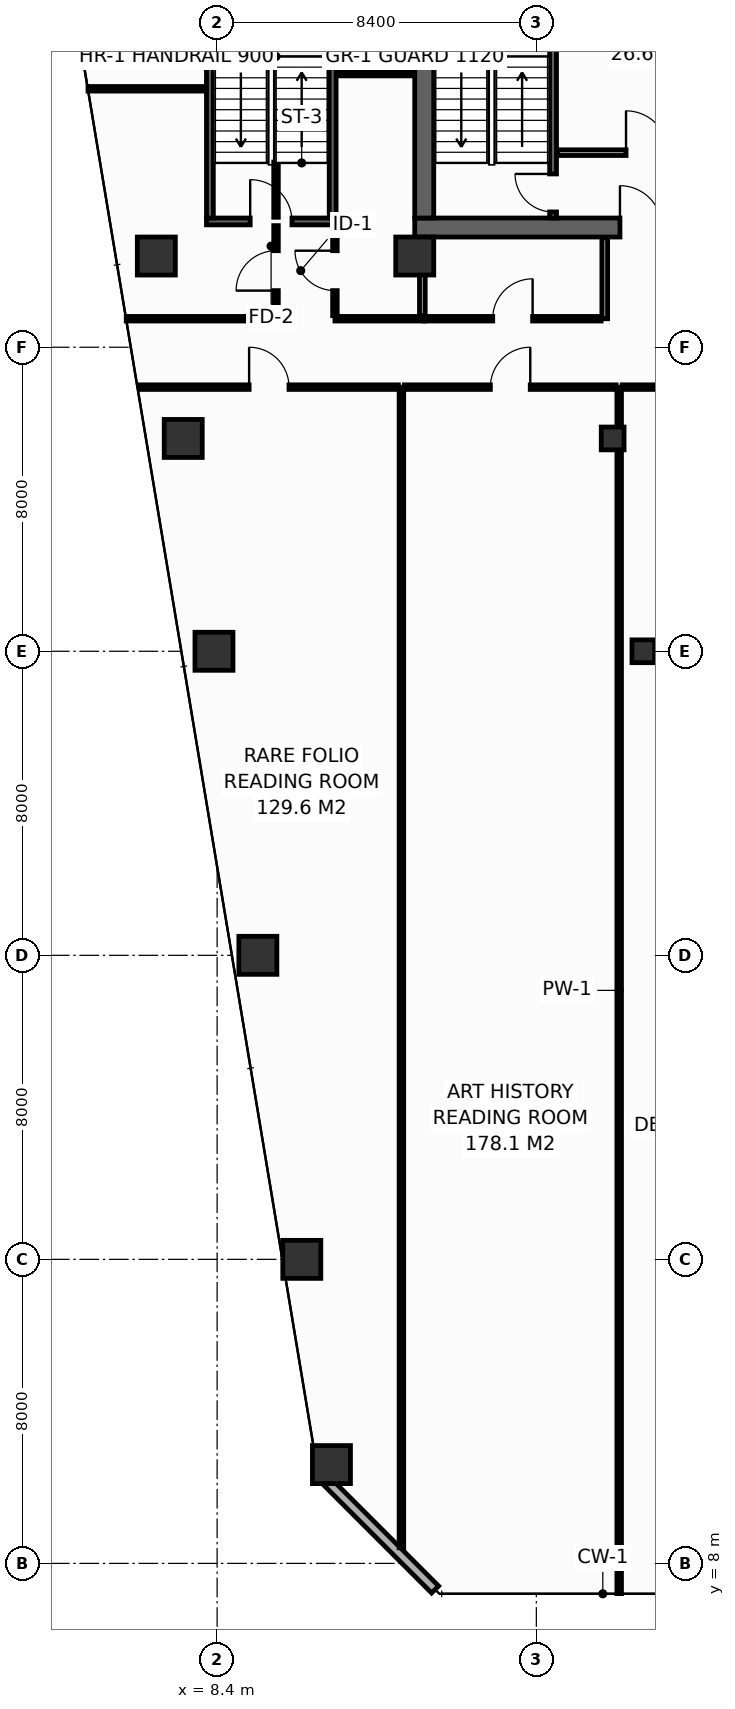
"""IFC4 building model, lengths in metres.
Left out: names, types, materials, properties, quantities, classifications, styles, units other than length and angle.
Written with IfcOpenShell. Run it as: python <this file> out.ifc"""

import sys

from ifc_helpers import new_model, si_unit, direction, frame, frame_2d, origin, origin_2d, place, context, subcontext, project, spatial, rectangle, hollow_rectangle, extrude, element, fill, save


model = new_model("IFC4")
c1 = context("Model", 3, precision=1e-05, world=origin(), true_north=direction((0.0, 1.0)))
c2 = subcontext(c1, "Body", "Model", "MODEL_VIEW")
j1 = project(units=[si_unit("LENGTHUNIT", "METRE"), si_unit("PLANEANGLEUNIT", "RADIAN")], contexts=[c1])
p1 = place(None, origin())
s1 = spatial("IfcSite", under=j1, at=p1, CompositionType="ELEMENT")
p2 = place(p1, origin())
s2 = spatial("IfcBuilding", under=s1, at=p2, CompositionType="ELEMENT")
p3 = place(p2, frame((0.0, 0.0, 133.4)))
s3 = spatial("IfcBuildingStorey", under=s2, at=p3, CompositionType="ELEMENT", Elevation=133.4)
p4 = place(p3, frame((13.6, 43.15, 0.0), z_axis=(0.0, 0.0, 1.0), x_axis=(1.0, 0.0, 0.0)))
e1 = element("IfcWall", 1, at=p4, inside=s3, PredefinedType="SHEAR", context=c2, shape_type="SweptSolid", body=[
    extrude(rectangle(XDim=32.7, YDim=0.5, at=frame_2d((16.35, 0.0))), origin(), (0.0, 0.0, 1.0), 3.55),
])
p5 = place(p4, frame((5.4, 0.0, 0.0)))
e2 = element("IfcOpeningElement", 2, at=p5, cuts=e1, PredefinedType="OPENING", context=c2, shape_type="SweptSolid", body=[
    extrude(rectangle(XDim=1.1, YDim=2.15, at=frame_2d((0.55, 1.075))), frame((0.0, 0.26, 0.0), z_axis=(0.0, -1.0, 0.0), x_axis=(1.0, 0.0, 0.0)), (0.0, 0.0, 1.0), 0.52),
])
p6 = place(p4, frame((25.6, 0.0, 0.0)))
e3 = element("IfcOpeningElement", 3, at=p6, cuts=e1, PredefinedType="OPENING", context=c2, shape_type="SweptSolid", body=[
    extrude(rectangle(XDim=1.1, YDim=2.15, at=frame_2d((0.55, 1.075))), frame((0.0, 0.26, 0.0), z_axis=(0.0, -1.0, 0.0), x_axis=(1.0, 0.0, 0.0)), (0.0, 0.0, 1.0), 0.52),
])
p7 = place(p3, frame((13.85, 43.4, 0.0), z_axis=(0.0, 0.0, 1.0), x_axis=(0.0, 1.0, 0.0)))
e4 = element("IfcWall", 4, at=p7, inside=s3, PredefinedType="SHEAR", context=c2, shape_type="SweptSolid", body=[
    extrude(rectangle(XDim=10.4, YDim=0.5, at=frame_2d((5.2, 0.0))), origin(), (0.0, 0.0, 1.0), 3.55),
])
for number, where, z_axis, x_axis in (
    (5, (6.8, 42.4, 0.0), (0.0, 0.0, 1.0), (1.0, 0.0, 0.0)),
    (6, (13.6, 42.4, 0.0), (0.0, 0.0, 1.0), (1.0, 0.0, 0.0)),
    (7, (11.408, 10.6, 0.0), (0.0, 0.0, 1.0), (1.0, 0.0, 0.0)),
    (8, (10.628, 16.0, 0.0), (0.0, 0.0, 1.0), (1.0, 0.0, 0.0)),
    (9, (9.472, 24.0, 0.0), (0.0, 0.0, 1.0), (1.0, 0.0, 0.0)),
    (10, (8.317, 32.0, 0.0), (0.0, 0.0, 1.0), (1.0, 0.0, 0.0)),
):
    element("IfcColumn", number, at=place(p3, frame(where, z_axis=z_axis, x_axis=x_axis)), inside=s3, PredefinedType="COLUMN", context=c2, shape_type="SweptSolid", body=[
        extrude(hollow_rectangle(XDim=1.0, YDim=1.0, WallThickness=0.045, at=origin_2d()), origin(), (0.0, 0.0, 1.0), 3.8),
    ])
p8 = place(p3, frame((19.617, 32.0, 0.0), z_axis=(0.0, 0.0, 1.0), x_axis=(1.0, 0.0, 0.0)))
e11 = element("IfcColumn", 11, at=p8, inside=s3, PredefinedType="COLUMN", context=c2, shape_type="SweptSolid", body=[
    extrude(hollow_rectangle(XDim=0.6, YDim=0.6, WallThickness=0.028, at=origin_2d()), origin(), (0.0, 0.0, 1.0), 3.8),
])
p9 = place(p3, frame((7.508, 37.6, 0.0), z_axis=(0.0, 0.0, 1.0), x_axis=(1.0, 0.0, 0.0)))
e12 = element("IfcColumn", 12, at=p9, inside=s3, PredefinedType="COLUMN", context=c2, shape_type="SweptSolid", body=[
    extrude(hollow_rectangle(XDim=1.0, YDim=1.0, WallThickness=0.045, at=origin_2d()), origin(), (0.0, 0.0, 1.0), 3.8),
])
p10 = place(p3, frame((18.808, 37.6, 0.0), z_axis=(0.0, 0.0, 1.0), x_axis=(1.0, 0.0, 0.0)))
e13 = element("IfcColumn", 13, at=p10, inside=s3, PredefinedType="COLUMN", context=c2, shape_type="SweptSolid", body=[
    extrude(hollow_rectangle(XDim=0.6, YDim=0.6, WallThickness=0.028, at=origin_2d()), origin(), (0.0, 0.0, 1.0), 3.8),
])
p11 = place(p3, frame((17.24, 43.4, 0.0), z_axis=(0.0, 0.0, 1.0), x_axis=(0.0, 1.0, 0.0)))
e14 = element("IfcWall", 14, at=p11, inside=s3, PredefinedType="SHEAR", context=c2, shape_type="SweptSolid", body=[
    extrude(rectangle(XDim=10.4, YDim=0.18, at=frame_2d((5.2, 0.0))), origin(), (0.0, 0.0, 1.0), 3.55),
])
p12 = place(p11, frame((0.16, 0.0, 0.0)))
e15 = element("IfcOpeningElement", 15, at=p12, cuts=e14, PredefinedType="OPENING", context=c2, shape_type="SweptSolid", body=[
    extrude(rectangle(XDim=1.0, YDim=2.15, at=frame_2d((0.5, 1.075))), frame((0.0, 0.1, 0.0), z_axis=(0.0, -1.0, 0.0), x_axis=(1.0, 0.0, 0.0)), (0.0, 0.0, 1.0), 0.2),
])
p13 = place(p3, frame((8.12, 43.31, 0.0), z_axis=(0.0, 0.0, 1.0), x_axis=(1.0, 0.0, 0.0)))
e16 = element("IfcWall", 16, at=p13, inside=s3, PredefinedType="SHEAR", context=c2, shape_type="SweptSolid", body=[
    extrude(rectangle(XDim=3.41, YDim=0.18, at=frame_2d((1.705, 0.0))), origin(), (0.0, 0.0, 1.0), 3.55),
])
p14 = place(p13, frame((1.15, 0.0, 0.0)))
e17 = element("IfcOpeningElement", 17, at=p14, cuts=e16, PredefinedType="OPENING", context=c2, shape_type="SweptSolid", body=[
    extrude(rectangle(XDim=1.1, YDim=2.15, at=frame_2d((0.55, 1.075))), frame((0.0, 0.1, 0.0), z_axis=(0.0, -1.0, 0.0), x_axis=(1.0, 0.0, 0.0)), (0.0, 0.0, 1.0), 0.2),
])
for number, where, z_axis, x_axis in (
    (18, (11.44, 43.4, 0.0), (0.0, 0.0, 1.0), (0.0, 1.0, 0.0)),
    (19, (8.21, 53.8, 0.0), (0.0, 0.0, 1.0), (0.0, -1.0, 0.0)),
):
    element("IfcWall", number, at=place(p3, frame(where, z_axis=z_axis, x_axis=x_axis)), inside=s3, PredefinedType="SHEAR", context=c2, shape_type="SweptSolid", body=[
        extrude(rectangle(XDim=10.4, YDim=0.18, at=frame_2d((5.2, 0.0))), origin(), (0.0, 0.0, 1.0), 3.55),
    ])
p15 = place(p3, frame((17.36, 45.12, 0.0), z_axis=(0.0, 0.0, 1.0), x_axis=(1.0, 0.0, 0.0)))
e20 = element("IfcWall", 20, at=p15, inside=s3, PredefinedType="PARTITIONING", context=c2, shape_type="SweptSolid", body=[
    extrude(rectangle(XDim=5.14, YDim=0.15, at=frame_2d((2.57, 0.0))), origin(), (0.0, 0.0, 1.0), 3.55),
])
p16 = place(p15, frame((1.8, 0.0, 0.0)))
e21 = element("IfcOpeningElement", 21, at=p16, cuts=e20, PredefinedType="OPENING", context=c2, shape_type="SweptSolid", body=[
    extrude(rectangle(XDim=1.1, YDim=2.15, at=frame_2d((0.55, 1.075))), frame((0.0, 0.085, 0.0), z_axis=(0.0, -1.0, 0.0), x_axis=(1.0, 0.0, 0.0)), (0.0, 0.0, 1.0), 0.17),
])
p17 = place(p3, frame((11.162, 10.287, 0.0), z_axis=(0.0, 0.0, 1.0), x_axis=(0.70707775441, -0.707135806771, 0.0)))
e22 = element("IfcWall", 22, at=p17, inside=s3, PredefinedType="STANDARD", context=c2, shape_type="SweptSolid", body=[
    extrude(rectangle(XDim=4.206, YDim=0.26, at=frame_2d((2.103, 0.0))), origin(), (0.0, 0.0, 1.0), 3.55),
])
p18 = place(p3, frame((6.008, 40.75, 0.0), z_axis=(0.0, 0.0, 1.0), x_axis=(1.0, 0.0, 0.0)))
e23 = element("IfcWall", 23, at=p18, inside=s3, PredefinedType="PARTITIONING", context=c2, shape_type="SweptSolid", body=[
    extrude(rectangle(XDim=3.942, YDim=0.12, at=frame_2d((1.971, 0.0))), origin(), (0.0, 0.0, 1.0), 3.035),
])
p19 = place(p3, frame((11.5, 40.75, 0.0), z_axis=(0.0, 0.0, 1.0), x_axis=(1.0, 0.0, 0.0)))
e24 = element("IfcWall", 24, at=p19, inside=s3, PredefinedType="PARTITIONING", context=c2, shape_type="SweptSolid", body=[
    extrude(rectangle(XDim=2.35, YDim=0.12, at=frame_2d((1.175, 0.0))), origin(), (0.0, 0.0, 1.0), 3.55),
])
p20 = place(p3, frame((5.003, 46.8, 0.0), z_axis=(0.0, 0.0, 1.0), x_axis=(1.0, 0.0, 0.0)))
e25 = element("IfcWall", 25, at=p20, inside=s3, PredefinedType="PARTITIONING", context=c2, shape_type="SweptSolid", body=[
    extrude(rectangle(XDim=3.097, YDim=0.12, at=frame_2d((1.549, 0.0))), origin(), (0.0, 0.0, 1.0), 2.835),
])
p21 = place(p3, frame((9.95, 40.83, 0.0), z_axis=(0.0, 0.0, 1.0), x_axis=(0.0, 1.0, 0.0)))
e26 = element("IfcWall", 26, at=p21, inside=s3, PredefinedType="PARTITIONING", context=c2, shape_type="SweptSolid", body=[
    extrude(rectangle(XDim=2.37, YDim=0.12, at=frame_2d((1.185, 0.0))), origin(), (0.0, 0.0, 1.0), 2.835),
])
p22 = place(p21, frame((0.66, 0.0, 0.0)))
e27 = element("IfcOpeningElement", 27, at=p22, cuts=e26, PredefinedType="OPENING", context=c2, shape_type="SweptSolid", body=[
    extrude(rectangle(XDim=1.05, YDim=2.15, at=frame_2d((0.525, 1.075))), frame((0.0, 0.07, 0.0), z_axis=(0.0, -1.0, 0.0), x_axis=(1.0, 0.0, 0.0)), (0.0, 0.0, 1.0), 0.14),
])
p23 = place(p3, frame((9.95, 43.42, 0.0), z_axis=(0.0, 0.0, 1.0), x_axis=(0.0, 1.0, 0.0)))
e28 = element("IfcWall", 28, at=p23, inside=s3, PredefinedType="PARTITIONING", context=c2, shape_type="SweptSolid", body=[
    extrude(rectangle(XDim=1.45, YDim=0.12, at=frame_2d((0.725, 0.0))), origin(), (0.0, 0.0, 1.0), 3.55),
])
p24 = place(p3, frame((11.55, 47.2, 0.0), z_axis=(0.0, 0.0, 1.0), x_axis=(1.0, 0.0, 0.0)))
e29 = element("IfcWall", 29, at=p24, inside=s3, PredefinedType="PARTITIONING", context=c2, shape_type="SweptSolid", body=[
    extrude(rectangle(XDim=2.03, YDim=0.12, at=frame_2d((1.015, 0.0))), origin(), (0.0, 0.0, 1.0), 3.55),
])
p25 = place(p3, frame((11.5, 40.83, 0.0), z_axis=(0.0, 0.0, 1.0), x_axis=(0.0, 1.0, 0.0)))
e30 = element("IfcWall", 30, at=p25, inside=s3, PredefinedType="PARTITIONING", context=c2, shape_type="SweptSolid", body=[
    extrude(rectangle(XDim=2.37, YDim=0.12, at=frame_2d((1.185, 0.0))), origin(), (0.0, 0.0, 1.0), 2.835),
])
p26 = place(p25, frame((0.66, 0.0, 0.0)))
e31 = element("IfcOpeningElement", 31, at=p26, cuts=e30, PredefinedType="OPENING", context=c2, shape_type="SweptSolid", body=[
    extrude(rectangle(XDim=1.05, YDim=2.15, at=frame_2d((0.525, 1.075))), frame((0.0, 0.07, 0.0), z_axis=(0.0, -1.0, 0.0), x_axis=(1.0, 0.0, 0.0)), (0.0, 0.0, 1.0), 0.14),
])
p27 = place(p3, frame((13.8, 40.83, 0.0), z_axis=(0.0, 0.0, 1.0), x_axis=(0.0, 1.0, 0.0)))
e32 = element("IfcWall", 32, at=p27, inside=s3, PredefinedType="PARTITIONING", context=c2, shape_type="SweptSolid", body=[
    extrude(rectangle(XDim=2.05, YDim=0.15, at=frame_2d((1.025, 0.0))), origin(), (0.0, 0.0, 1.0), 3.55),
])
p28 = place(p3, frame((18.6, 40.75, 0.0), z_axis=(0.0, 0.0, 1.0), x_axis=(0.0, 1.0, 0.0)))
e33 = element("IfcWall", 33, at=p28, inside=s3, PredefinedType="PARTITIONING", context=c2, shape_type="SweptSolid", body=[
    extrude(rectangle(XDim=2.13, YDim=0.15, at=frame_2d((1.065, 0.0))), origin(), (0.0, 0.0, 1.0), 3.55),
])
p29 = place(p3, frame((13.85, 40.75, 0.0), z_axis=(0.0, 0.0, 1.0), x_axis=(1.0, 0.0, 0.0)))
e34 = element("IfcWall", 34, at=p29, inside=s3, PredefinedType="PARTITIONING", context=c2, shape_type="SweptSolid", body=[
    extrude(rectangle(XDim=4.655, YDim=0.12, at=frame_2d((2.327, 0.0))), origin(), (0.0, 0.0, 1.0), 3.55),
])
p30 = place(p29, frame((1.802, 0.0, 0.0)))
e35 = element("IfcOpeningElement", 35, at=p30, cuts=e34, PredefinedType="OPENING", context=c2, shape_type="SweptSolid", body=[
    extrude(rectangle(XDim=1.05, YDim=2.15, at=frame_2d((0.525, 1.075))), frame((0.0, 0.07, 0.0), z_axis=(0.0, -1.0, 0.0), x_axis=(1.0, 0.0, 0.0)), (0.0, 0.0, 1.0), 0.14),
])
p31 = place(p3, frame((13.25, 8.411, 0.0), z_axis=(0.0, 0.0, 1.0), x_axis=(0.0, 1.0, 0.0)))
e36 = element("IfcWall", 36, at=p31, inside=s3, PredefinedType="PARTITIONING", context=c2, shape_type="SweptSolid", body=[
    extrude(rectangle(XDim=30.539, YDim=0.12, at=frame_2d((15.27, 0.0))), origin(), (0.0, 0.0, 1.0), 2.835),
])
p32 = place(p3, frame((18.98, 7.205, 0.0), z_axis=(0.0, 0.0, 1.0), x_axis=(0.0, 1.0, 0.0)))
e37 = element("IfcWall", 37, at=p32, inside=s3, PredefinedType="PARTITIONING", context=c2, shape_type="SweptSolid", body=[
    extrude(rectangle(XDim=31.745, YDim=0.12, at=frame_2d((15.873, 0.0))), origin(), (0.0, 0.0, 1.0), 2.835),
])
p33 = place(p3, frame((6.363, 38.95, 0.0), z_axis=(0.0, 0.0, 1.0), x_axis=(1.0, 0.0, 0.0)))
e38 = element("IfcWall", 38, at=p33, inside=s3, PredefinedType="PARTITIONING", context=c2, shape_type="SweptSolid", body=[
    extrude(rectangle(XDim=6.807, YDim=0.12, at=frame_2d((3.404, 0.0))), origin(), (0.0, 0.0, 1.0), 3.035),
])
p34 = place(p33, frame((2.879, 0.0, 0.0)))
e39 = element("IfcOpeningElement", 39, at=p34, cuts=e38, PredefinedType="OPENING", context=c2, shape_type="SweptSolid", body=[
    extrude(rectangle(XDim=1.05, YDim=2.15, at=frame_2d((0.525, 1.075))), frame((0.0, 0.07, 0.0), z_axis=(0.0, -1.0, 0.0), x_axis=(1.0, 0.0, 0.0)), (0.0, 0.0, 1.0), 0.14),
])
p35 = place(p3, frame((13.33, 38.95, 0.0), z_axis=(0.0, 0.0, 1.0), x_axis=(1.0, 0.0, 0.0)))
e40 = element("IfcWall", 40, at=p35, inside=s3, PredefinedType="PARTITIONING", context=c2, shape_type="SweptSolid", body=[
    extrude(rectangle(XDim=5.57, YDim=0.12, at=frame_2d((2.785, 0.0))), origin(), (0.0, 0.0, 1.0), 3.55),
])
p36 = place(p35, frame((2.26, 0.0, 0.0)))
e41 = element("IfcOpeningElement", 41, at=p36, cuts=e40, PredefinedType="OPENING", context=c2, shape_type="SweptSolid", body=[
    extrude(rectangle(XDim=1.05, YDim=2.15, at=frame_2d((0.525, 1.075))), frame((0.0, 0.07, 0.0), z_axis=(0.0, -1.0, 0.0), x_axis=(1.0, 0.0, 0.0)), (0.0, 0.0, 1.0), 0.14),
])
p37 = place(p3, frame((19.06, 38.95, 0.0), z_axis=(0.0, 0.0, 1.0), x_axis=(1.0, 0.0, 0.0)))
e42 = element("IfcWall", 42, at=p37, inside=s3, PredefinedType="PARTITIONING", context=c2, shape_type="SweptSolid", body=[
    extrude(rectangle(XDim=4.79, YDim=0.12, at=frame_2d((2.395, 0.0))), origin(), (0.0, 0.0, 1.0), 2.835),
])
p38 = place(p37, frame((1.945, 0.0, 0.0)))
e43 = element("IfcOpeningElement", 43, at=p38, cuts=e42, PredefinedType="OPENING", context=c2, shape_type="SweptSolid", body=[
    extrude(rectangle(XDim=0.9, YDim=2.1, at=frame_2d((0.45, 1.05))), frame((0.0, 0.07, 0.0), z_axis=(0.0, -1.0, 0.0), x_axis=(1.0, 0.0, 0.0)), (0.0, 0.0, 1.0), 0.14),
])
p39 = place(p12, origin())
e44 = element("IfcDoor", 44, at=p39, inside=s3, OperationType="SINGLE_SWING_RIGHT", PredefinedType="DOOR", context=c2, shape_type="SweptSolid", body=[
    extrude(rectangle(XDim=1.0, YDim=2.15, at=frame_2d((0.5, 1.075))), frame((0.0, 0.025, 0.0), z_axis=(0.0, -1.0, 0.0), x_axis=(1.0, 0.0, 0.0)), (0.0, 0.0, 1.0), 0.05),
])
fill(e15, e44)
p40 = place(p14, origin())
e45 = element("IfcDoor", 45, at=p40, inside=s3, OperationType="SINGLE_SWING_LEFT", PredefinedType="DOOR", context=c2, shape_type="SweptSolid", body=[
    extrude(rectangle(XDim=1.1, YDim=2.15, at=frame_2d((0.55, 1.075))), frame((0.0, 0.025, 0.0), z_axis=(0.0, -1.0, 0.0), x_axis=(1.0, 0.0, 0.0)), (0.0, 0.0, 1.0), 0.05),
])
fill(e17, e45)
p41 = place(p16, origin())
e46 = element("IfcDoor", 46, at=p41, inside=s3, OperationType="SINGLE_SWING_LEFT", PredefinedType="DOOR", context=c2, shape_type="SweptSolid", body=[
    extrude(rectangle(XDim=1.1, YDim=2.15, at=frame_2d((0.55, 1.075))), frame((0.0, 0.025, 0.0), z_axis=(0.0, -1.0, 0.0), x_axis=(1.0, 0.0, 0.0)), (0.0, 0.0, 1.0), 0.05),
])
fill(e21, e46)
p42 = place(p5, origin())
e47 = element("IfcDoor", 47, at=p42, inside=s3, OperationType="SINGLE_SWING_LEFT", PredefinedType="DOOR", context=c2, shape_type="SweptSolid", body=[
    extrude(rectangle(XDim=1.1, YDim=2.15, at=frame_2d((0.55, 1.075))), frame((0.0, 0.025, 0.0), z_axis=(0.0, -1.0, 0.0), x_axis=(1.0, 0.0, 0.0)), (0.0, 0.0, 1.0), 0.05),
])
fill(e2, e47)
p43 = place(p22, origin())
e48 = element("IfcDoor", 48, at=p43, inside=s3, OperationType="SINGLE_SWING_LEFT", PredefinedType="DOOR", context=c2, shape_type="SweptSolid", body=[
    extrude(rectangle(XDim=1.05, YDim=2.15, at=frame_2d((0.525, 1.075))), frame((0.0, 0.025, 0.0), z_axis=(0.0, -1.0, 0.0), x_axis=(1.0, 0.0, 0.0)), (0.0, 0.0, 1.0), 0.05),
])
fill(e27, e48)
p44 = place(p26, origin())
e49 = element("IfcDoor", 49, at=p44, inside=s3, OperationType="SINGLE_SWING_RIGHT", PredefinedType="DOOR", context=c2, shape_type="SweptSolid", body=[
    extrude(rectangle(XDim=1.05, YDim=2.15, at=frame_2d((0.525, 1.075))), frame((0.0, 0.025, 0.0), z_axis=(0.0, -1.0, 0.0), x_axis=(1.0, 0.0, 0.0)), (0.0, 0.0, 1.0), 0.05),
])
fill(e31, e49)
p45 = place(p30, origin())
e50 = element("IfcDoor", 50, at=p45, inside=s3, OperationType="SINGLE_SWING_RIGHT", PredefinedType="DOOR", context=c2, shape_type="SweptSolid", body=[
    extrude(rectangle(XDim=1.05, YDim=2.15, at=frame_2d((0.525, 1.075))), frame((0.0, 0.025, 0.0), z_axis=(0.0, -1.0, 0.0), x_axis=(1.0, 0.0, 0.0)), (0.0, 0.0, 1.0), 0.05),
])
fill(e35, e50)
p46 = place(p34, origin())
e51 = element("IfcDoor", 51, at=p46, inside=s3, OperationType="SINGLE_SWING_LEFT", PredefinedType="DOOR", context=c2, shape_type="SweptSolid", body=[
    extrude(rectangle(XDim=1.05, YDim=2.15, at=frame_2d((0.525, 1.075))), frame((0.0, 0.025, 0.0), z_axis=(0.0, -1.0, 0.0), x_axis=(1.0, 0.0, 0.0)), (0.0, 0.0, 1.0), 0.05),
])
fill(e39, e51)
p47 = place(p36, origin())
e52 = element("IfcDoor", 52, at=p47, inside=s3, OperationType="SINGLE_SWING_RIGHT", PredefinedType="DOOR", context=c2, shape_type="SweptSolid", body=[
    extrude(rectangle(XDim=1.05, YDim=2.15, at=frame_2d((0.525, 1.075))), frame((0.0, 0.025, 0.0), z_axis=(0.0, -1.0, 0.0), x_axis=(1.0, 0.0, 0.0)), (0.0, 0.0, 1.0), 0.05),
])
fill(e41, e52)
save(model, sys.argv[1])
